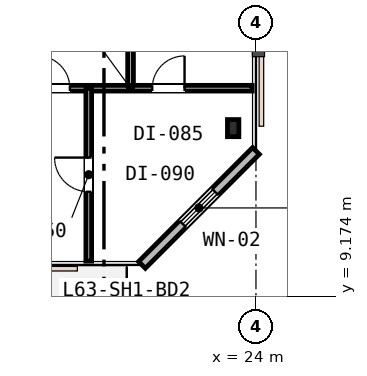
"""IFC4 building model, lengths in metres.
Left out: names, types, materials, properties, quantities, classifications, styles, units other than length and angle.
Written with IfcOpenShell. Run it as: python <this file> out.ifc"""

import sys

from ifc_helpers import new_model, si_unit, direction, frame, frame_2d, origin, origin_2d, place, context, subcontext, project, spatial, rectangle, i_section, extrude, element, fill, save


model = new_model("IFC4")
c1 = context("Model", 3, precision=1e-05, world=origin(), true_north=direction((0.0, 1.0)))
c2 = subcontext(c1, "Body", "Model", "MODEL_VIEW")
j1 = project(units=[si_unit("LENGTHUNIT", "METRE"), si_unit("PLANEANGLEUNIT", "RADIAN")], contexts=[c1])
p1 = place(None, origin())
s1 = spatial("IfcSite", under=j1, at=p1, CompositionType="ELEMENT")
p2 = place(p1, origin())
s2 = spatial("IfcBuilding", under=s1, at=p2, CompositionType="ELEMENT")
p3 = place(p2, frame((0.0, 0.0, 245.0)))
s3 = spatial("IfcBuildingStorey", under=s2, at=p3, CompositionType="ELEMENT", Elevation=245.0)
p4 = place(p3, frame((23.4, 13.6, 0.0), z_axis=(0.0, 0.0, 1.0), x_axis=(1.0, 0.0, 0.0)))
e1 = element("IfcColumn", 1, at=p4, inside=s3, PredefinedType="COLUMN", context=c2, shape_type="SweptSolid", body=[
    extrude(i_section(OverallWidth=0.3, OverallDepth=0.45, WebThickness=0.014, FlangeThickness=0.026, FilletRadius=0.027, at=origin_2d()), origin(), (0.0, 0.0, 1.0), 3.8),
])
p5 = place(p3, frame((21.0, 10.0, 0.0), z_axis=(0.0, 0.0, 1.0), x_axis=(0.707106781187, 0.707106781187, 0.0)))
e2 = element("IfcWall", 2, at=p5, inside=s3, PredefinedType="STANDARD", context=c2, shape_type="SweptSolid", body=[
    extrude(rectangle(XDim=4.243, YDim=0.25, at=frame_2d((2.121, 0.0))), origin(), (0.0, 0.0, 1.0), 3.53),
])
p6 = place(p5, frame((1.521, 0.0, 0.85)))
e3 = element("IfcOpeningElement", 3, at=p6, cuts=e2, PredefinedType="OPENING", context=c2, shape_type="SweptSolid", body=[
    extrude(rectangle(XDim=1.2, YDim=1.6, at=frame_2d((0.6, 0.8))), frame((0.0, 0.135, 0.0), z_axis=(0.0, -1.0, 0.0), x_axis=(1.0, 0.0, 0.0)), (0.0, 0.0, 1.0), 0.27),
])
p7 = place(p3, frame((20.7, 14.65, 0.0), z_axis=(0.0, 0.0, 1.0), x_axis=(0.0, 1.0, 0.0)))
e4 = element("IfcWall", 4, at=p7, inside=s3, PredefinedType="PARTITIONING", context=c2, shape_type="SweptSolid", body=[
    extrude(rectangle(XDim=2.35, YDim=0.15, at=frame_2d((1.175, 0.0))), origin(), (0.0, 0.0, 1.0), 3.28),
])
p8 = place(p3, frame((17.5, 14.65, 0.0), z_axis=(0.0, 0.0, 1.0), x_axis=(1.0, 0.0, 0.0)))
e5 = element("IfcWall", 5, at=p8, inside=s3, PredefinedType="PARTITIONING", context=c2, shape_type="SweptSolid", body=[
    extrude(rectangle(XDim=6.4, YDim=0.15, at=frame_2d((3.2, 0.0))), origin(), (0.0, 0.0, 1.0), 3.27),
])
p9 = place(p8, frame((0.753, 0.0, 0.0)))
e6 = element("IfcOpeningElement", 6, at=p9, cuts=e5, PredefinedType="OPENING", context=c2, shape_type="SweptSolid", body=[
    extrude(rectangle(XDim=0.85, YDim=2.15, at=frame_2d((0.425, 1.075))), frame((0.0, 0.085, 0.0), z_axis=(0.0, -1.0, 0.0), x_axis=(1.0, 0.0, 0.0)), (0.0, 0.0, 1.0), 0.17),
])
p10 = place(p8, frame((3.771, 0.0, 0.0)))
e7 = element("IfcOpeningElement", 7, at=p10, cuts=e5, PredefinedType="OPENING", context=c2, shape_type="SweptSolid", body=[
    extrude(rectangle(XDim=0.85, YDim=2.15, at=frame_2d((0.425, 1.075))), frame((0.0, 0.085, 0.0), z_axis=(0.0, -1.0, 0.0), x_axis=(1.0, 0.0, 0.0)), (0.0, 0.0, 1.0), 0.17),
])
p11 = place(p3, frame((19.6, 10.1, 0.0), z_axis=(0.0, 0.0, 1.0), x_axis=(0.0, 1.0, 0.0)))
e8 = element("IfcWall", 8, at=p11, inside=s3, PredefinedType="PARTITIONING", context=c2, shape_type="SweptSolid", body=[
    extrude(rectangle(XDim=4.55, YDim=0.15, at=frame_2d((2.275, 0.0))), origin(), (0.0, 0.0, 1.0), 3.16),
])
p12 = place(p11, frame((1.825, 0.0, 0.0)))
e9 = element("IfcOpeningElement", 9, at=p12, cuts=e8, PredefinedType="OPENING", context=c2, shape_type="SweptSolid", body=[
    extrude(rectangle(XDim=0.9, YDim=2.15, at=frame_2d((0.45, 1.075))), frame((0.0, 0.085, 0.0), z_axis=(0.0, -1.0, 0.0), x_axis=(1.0, 0.0, 0.0)), (0.0, 0.0, 1.0), 0.17),
])
p13 = place(p6, origin())
e10 = element("IfcWindow", 10, at=p13, inside=s3, PartitioningType="SINGLE_PANEL", PredefinedType="WINDOW", context=c2, shape_type="SweptSolid", body=[
    extrude(rectangle(XDim=1.2, YDim=1.6, at=frame_2d((0.6, 0.8))), frame((0.0, 0.03, 0.0), z_axis=(0.0, -1.0, 0.0), x_axis=(1.0, 0.0, 0.0)), (0.0, 0.0, 1.0), 0.06),
])
fill(e3, e10)
p14 = place(p9, origin())
e11 = element("IfcDoor", 11, at=p14, inside=s3, OperationType="SINGLE_SWING_LEFT", PredefinedType="DOOR", context=c2, shape_type="SweptSolid", body=[
    extrude(rectangle(XDim=0.85, YDim=2.15, at=frame_2d((0.425, 1.075))), frame((0.0, 0.025, 0.0), z_axis=(0.0, -1.0, 0.0), x_axis=(1.0, 0.0, 0.0)), (0.0, 0.0, 1.0), 0.05),
])
fill(e6, e11)
p15 = place(p10, origin())
e12 = element("IfcDoor", 12, at=p15, inside=s3, OperationType="SINGLE_SWING_RIGHT", PredefinedType="DOOR", context=c2, shape_type="SweptSolid", body=[
    extrude(rectangle(XDim=0.85, YDim=2.15, at=frame_2d((0.425, 1.075))), frame((0.0, 0.025, 0.0), z_axis=(0.0, -1.0, 0.0), x_axis=(1.0, 0.0, 0.0)), (0.0, 0.0, 1.0), 0.05),
])
fill(e7, e12)
p16 = place(p12, origin())
e13 = element("IfcDoor", 13, at=p16, inside=s3, OperationType="SINGLE_SWING_RIGHT", PredefinedType="DOOR", context=c2, shape_type="SweptSolid", body=[
    extrude(rectangle(XDim=0.9, YDim=2.15, at=frame_2d((0.45, 1.075))), frame((0.0, 0.025, 0.0), z_axis=(0.0, -1.0, 0.0), x_axis=(1.0, 0.0, 0.0)), (0.0, 0.0, 1.0), 0.05),
])
fill(e9, e13)
save(model, sys.argv[1])
